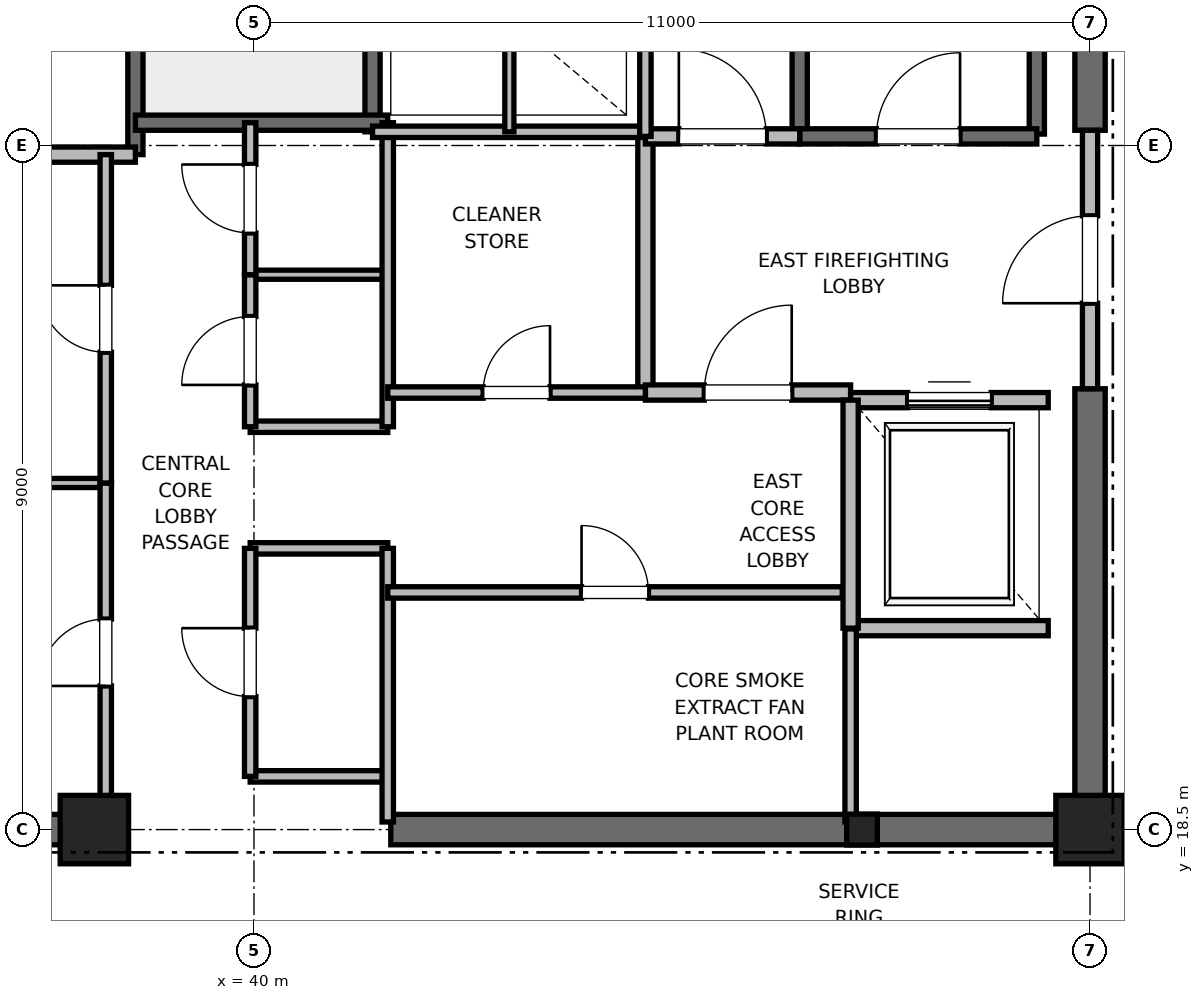
"""IFC4 building model, lengths in metres.
Left out: names, types, materials, properties, quantities, classifications, styles, units other than length and angle.
Written with IfcOpenShell. Run it as: python <this file> out.ifc"""

import sys

from ifc_helpers import new_model, si_unit, direction, frame, frame_2d, origin, origin_2d, place, context, subcontext, project, spatial, rectangle, i_section, extrude, element, fill, save


model = new_model("IFC4")
c1 = context("Model", 3, precision=1e-05, world=origin(), true_north=direction((0.0, 1.0)))
c2 = subcontext(c1, "Body", "Model", "MODEL_VIEW")
j1 = project(units=[si_unit("LENGTHUNIT", "METRE"), si_unit("PLANEANGLEUNIT", "RADIAN")], contexts=[c1])
p1 = place(None, origin())
s1 = spatial("IfcSite", under=j1, at=p1, CompositionType="ELEMENT")
p2 = place(p1, origin())
s2 = spatial("IfcBuilding", under=s1, at=p2, CompositionType="ELEMENT")
p3 = place(p2, frame((0.0, 0.0, 342.8)))
s3 = spatial("IfcBuildingStorey", under=s2, at=p3, CompositionType="ELEMENT", Elevation=342.8)
for number, where, z_axis, x_axis in (
    (1, (51.0, 18.5, 0.0), (0.0, 0.0, 1.0), (1.0, 0.0, 0.0)),
    (2, (37.9, 18.5, 0.0), (0.0, 0.0, 1.0), (1.0, 0.0, 0.0)),
):
    element("IfcColumn", number, at=place(p3, frame(where, z_axis=z_axis, x_axis=x_axis)), inside=s3, PredefinedType="PILASTER", context=c2, shape_type="SweptSolid", body=[
        extrude(rectangle(XDim=0.9, YDim=0.9, at=origin_2d()), origin(), (0.0, 0.0, 1.0), 6.0),
    ])
p4 = place(p3, frame((48.0, 18.5, 0.0), z_axis=(0.0, 0.0, 1.0), x_axis=(1.0, 0.0, 0.0)))
e3 = element("IfcColumn", 3, at=p4, inside=s3, PredefinedType="COLUMN", context=c2, shape_type="SweptSolid", body=[
    extrude(i_section(OverallWidth=0.403, OverallDepth=0.406, WebThickness=0.027, FlangeThickness=0.043, FilletRadius=0.015, at=origin_2d()), origin(), (0.0, 0.0, 1.0), 6.0),
])
for number, where, z_axis, x_axis in (
    (4, (29.0, 18.5, 0.0), (0.0, 0.0, 1.0), (1.0, 0.0, 0.0)),
    (5, (41.8, 18.5, 0.0), (0.0, 0.0, 1.0), (1.0, 0.0, 0.0)),
):
    element("IfcWall", number, at=place(p3, frame(where, z_axis=z_axis, x_axis=x_axis)), inside=s3, PredefinedType="SHEAR", context=c2, shape_type="SweptSolid", body=[
        extrude(rectangle(XDim=9.2, YDim=0.4, at=frame_2d((4.6, 0.0))), origin(), (0.0, 0.0, 1.0), 5.7),
    ])
p5 = place(p3, frame((51.0, 18.5, 0.0), z_axis=(0.0, 0.0, 1.0), x_axis=(0.0, 1.0, 0.0)))
e6 = element("IfcWall", 6, at=p5, inside=s3, PredefinedType="SHEAR", context=c2, shape_type="SweptSolid", body=[
    extrude(rectangle(XDim=5.8, YDim=0.4, at=frame_2d((2.9, 0.0))), origin(), (0.0, 0.0, 1.0), 5.7),
])
p6 = place(p3, frame((51.0, 27.7, 0.0), z_axis=(0.0, 0.0, 1.0), x_axis=(0.0, 1.0, 0.0)))
e7 = element("IfcWall", 7, at=p6, inside=s3, PredefinedType="SHEAR", context=c2, shape_type="SweptSolid", body=[
    extrude(rectangle(XDim=8.8, YDim=0.4, at=frame_2d((4.4, 0.0))), origin(), (0.0, 0.0, 1.0), 5.7),
])
p7 = place(p3, frame((50.3, 27.65, 0.0), z_axis=(0.0, 0.0, 1.0), x_axis=(0.0, 1.0, 0.0)))
e8 = element("IfcWall", 8, at=p7, inside=s3, PredefinedType="SOLIDWALL", context=c2, shape_type="SweptSolid", body=[
    extrude(rectangle(XDim=8.15, YDim=0.2, at=frame_2d((4.075, 0.0))), origin(), (0.0, 0.0, 1.0), 5.7),
])
p8 = place(p3, frame((47.18, 27.62, 0.0), z_axis=(0.0, 0.0, 1.0), x_axis=(0.0, 1.0, 0.0)))
e9 = element("IfcWall", 9, at=p8, inside=s3, PredefinedType="SOLIDWALL", context=c2, shape_type="SweptSolid", body=[
    extrude(rectangle(XDim=8.18, YDim=0.2, at=frame_2d((4.09, 0.0))), origin(), (0.0, 0.0, 1.0), 5.7),
])
p9 = place(p3, frame((47.18, 27.62, 0.0), z_axis=(0.0, 0.0, 1.0), x_axis=(1.0, 0.0, 0.0)))
e10 = element("IfcWall", 10, at=p9, inside=s3, PredefinedType="SOLIDWALL", context=c2, shape_type="SweptSolid", body=[
    extrude(rectangle(XDim=3.12, YDim=0.2, at=frame_2d((1.56, 0.0))), origin(), (0.0, 0.0, 1.0), 5.7),
])
p10 = place(p9, frame((1.01, 0.0, 0.0)))
e11 = element("IfcOpeningElement", 11, at=p10, cuts=e10, PredefinedType="OPENING", context=c2, shape_type="SweptSolid", body=[
    extrude(rectangle(XDim=1.1, YDim=2.15, at=frame_2d((0.55, 1.075))), frame((0.0, 0.1, 0.0), z_axis=(0.0, -1.0, 0.0), x_axis=(1.0, 0.0, 0.0)), (0.0, 0.0, 1.0), 0.2),
])
p11 = place(p3, frame((38.44, 27.38, 0.0), z_axis=(0.0, 0.0, 1.0), x_axis=(0.0, 1.0, 0.0)))
e12 = element("IfcWall", 12, at=p11, inside=s3, PredefinedType="SOLIDWALL", context=c2, shape_type="SweptSolid", body=[
    extrude(rectangle(XDim=8.87, YDim=0.2, at=frame_2d((4.435, 0.0))), origin(), (0.0, 0.0, 1.0), 5.7),
])
p12 = place(p3, frame((41.56, 27.68, 0.0), z_axis=(0.0, 0.0, 1.0), x_axis=(0.0, 1.0, 0.0)))
e13 = element("IfcWall", 13, at=p12, inside=s3, PredefinedType="SOLIDWALL", context=c2, shape_type="SweptSolid", body=[
    extrude(rectangle(XDim=8.57, YDim=0.2, at=frame_2d((4.285, 0.0))), origin(), (0.0, 0.0, 1.0), 5.7),
])
p13 = place(p3, frame((38.44, 27.8, 0.0), z_axis=(0.0, 0.0, 1.0), x_axis=(1.0, 0.0, 0.0)))
e14 = element("IfcWall", 14, at=p13, inside=s3, PredefinedType="SOLIDWALL", context=c2, shape_type="SweptSolid", body=[
    extrude(rectangle(XDim=3.32, YDim=0.2, at=frame_2d((1.66, 0.0))), origin(), (0.0, 0.0, 1.0), 5.7),
])
p14 = place(p3, frame((32.82, 27.38, 0.0), z_axis=(0.0, 0.0, 1.0), x_axis=(1.0, 0.0, 0.0)))
e15 = element("IfcWall", 15, at=p14, inside=s3, PredefinedType="PARTITIONING", context=c2, shape_type="SweptSolid", body=[
    extrude(rectangle(XDim=5.62, YDim=0.2, at=frame_2d((2.81, 0.0))), origin(), (0.0, 0.0, 1.0), 5.7),
])
p15 = place(p3, frame((45.15, 24.25, 0.0), z_axis=(0.0, 0.0, 1.0), x_axis=(0.0, 1.0, 0.0)))
e16 = element("IfcWall", 16, at=p15, inside=s3, PredefinedType="PARTITIONING", context=c2, shape_type="SweptSolid", body=[
    extrude(rectangle(XDim=3.37, YDim=0.2, at=frame_2d((1.685, 0.0))), origin(), (0.0, 0.0, 1.0), 5.7),
])
p16 = place(p3, frame((45.15, 24.25, 0.0), z_axis=(0.0, 0.0, 1.0), x_axis=(1.0, 0.0, 0.0)))
e17 = element("IfcWall", 17, at=p16, inside=s3, PredefinedType="PARTITIONING", context=c2, shape_type="SweptSolid", body=[
    extrude(rectangle(XDim=2.7, YDim=0.2, at=frame_2d((1.35, 0.0))), origin(), (0.0, 0.0, 1.0), 5.7),
])
p17 = place(p16, frame((0.775, 0.0, 0.0)))
e18 = element("IfcOpeningElement", 18, at=p17, cuts=e17, PredefinedType="OPENING", context=c2, shape_type="SweptSolid", body=[
    extrude(rectangle(XDim=1.15, YDim=2.2, at=frame_2d((0.575, 1.1))), frame((0.0, 0.1, 0.0), z_axis=(0.0, -1.0, 0.0), x_axis=(1.0, 0.0, 0.0)), (0.0, 0.0, 1.0), 0.2),
])
p18 = place(p3, frame((45.15, 27.62, 0.0), z_axis=(0.0, 0.0, 1.0), x_axis=(1.0, 0.0, 0.0)))
e19 = element("IfcWall", 19, at=p18, inside=s3, PredefinedType="PARTITIONING", context=c2, shape_type="SweptSolid", body=[
    extrude(rectangle(XDim=2.03, YDim=0.2, at=frame_2d((1.015, 0.0))), origin(), (0.0, 0.0, 1.0), 5.7),
])
p19 = place(p18, frame((0.44, 0.0, 0.0)))
e20 = element("IfcOpeningElement", 20, at=p19, cuts=e19, PredefinedType="OPENING", context=c2, shape_type="SweptSolid", body=[
    extrude(rectangle(XDim=1.15, YDim=2.2, at=frame_2d((0.575, 1.1))), frame((0.0, 0.1, 0.0), z_axis=(0.0, -1.0, 0.0), x_axis=(1.0, 0.0, 0.0)), (0.0, 0.0, 1.0), 0.2),
])
p20 = place(p3, frame((51.0, 24.3, 0.0), z_axis=(0.0, 0.0, 1.0), x_axis=(0.0, 1.0, 0.0)))
e21 = element("IfcWall", 21, at=p20, inside=s3, PredefinedType="PARTITIONING", context=c2, shape_type="SweptSolid", body=[
    extrude(rectangle(XDim=3.4, YDim=0.2, at=frame_2d((1.7, 0.0))), origin(), (0.0, 0.0, 1.0), 4.78),
])
p21 = place(p20, frame((1.125, 0.0, 0.0)))
e22 = element("IfcOpeningElement", 22, at=p21, cuts=e21, PredefinedType="OPENING", context=c2, shape_type="SweptSolid", body=[
    extrude(rectangle(XDim=1.15, YDim=2.2, at=frame_2d((0.575, 1.1))), frame((0.0, 0.1, 0.0), z_axis=(0.0, -1.0, 0.0), x_axis=(1.0, 0.0, 0.0)), (0.0, 0.0, 1.0), 0.2),
])
p22 = place(p3, frame((47.85, 21.15, 0.0), z_axis=(0.0, 0.0, 1.0), x_axis=(1.0, 0.0, 0.0)))
e23 = element("IfcWall", 23, at=p22, inside=s3, PredefinedType="SOLIDWALL", context=c2, shape_type="SweptSolid", body=[
    extrude(rectangle(XDim=2.6, YDim=0.2, at=frame_2d((1.3, 0.0))), origin(), (0.0, 0.0, 1.0), 5.7),
])
p23 = place(p3, frame((50.45, 24.15, 0.0), z_axis=(0.0, 0.0, 1.0), x_axis=(-1.0, 0.0, 0.0)))
e24 = element("IfcWall", 24, at=p23, inside=s3, PredefinedType="SOLIDWALL", context=c2, shape_type="SweptSolid", body=[
    extrude(rectangle(XDim=2.6, YDim=0.2, at=frame_2d((1.3, 0.0))), origin(), (0.0, 0.0, 1.0), 4.78),
])
p24 = place(p23, frame((0.75, 0.0, 0.0)))
e25 = element("IfcOpeningElement", 25, at=p24, cuts=e24, PredefinedType="OPENING", context=c2, shape_type="SweptSolid", body=[
    extrude(rectangle(XDim=1.1, YDim=2.2, at=frame_2d((0.55, 1.1))), frame((0.0, 0.1, 0.0), z_axis=(0.0, -1.0, 0.0), x_axis=(1.0, 0.0, 0.0)), (0.0, 0.0, 1.0), 0.2),
])
p25 = place(p3, frame((47.85, 24.15, 0.0), z_axis=(0.0, 0.0, 1.0), x_axis=(0.0, -1.0, 0.0)))
e26 = element("IfcWall", 26, at=p25, inside=s3, PredefinedType="SOLIDWALL", context=c2, shape_type="SweptSolid", body=[
    extrude(rectangle(XDim=3.0, YDim=0.2, at=frame_2d((1.5, 0.0))), origin(), (0.0, 0.0, 1.0), 5.7),
])
for number, where, z_axis, x_axis in (
    (27, (39.95, 19.2, 0.0), (0.0, 0.0, 1.0), (1.0, 0.0, 0.0)),
    (28, (39.95, 22.2, 0.0), (0.0, 0.0, 1.0), (1.0, 0.0, 0.0)),
    (29, (39.95, 23.8, 0.0), (0.0, 0.0, 1.0), (1.0, 0.0, 0.0)),
):
    element("IfcWall", number, at=place(p3, frame(where, z_axis=z_axis, x_axis=x_axis)), inside=s3, PredefinedType="PARTITIONING", context=c2, shape_type="SweptSolid", body=[
        extrude(rectangle(XDim=1.81, YDim=0.15, at=frame_2d((0.905, 0.0))), origin(), (0.0, 0.0, 1.0), 2.85),
    ])
p26 = place(p3, frame((39.95, 25.8, 0.0), z_axis=(0.0, 0.0, 1.0), x_axis=(1.0, 0.0, 0.0)))
e30 = element("IfcWall", 30, at=p26, inside=s3, PredefinedType="PARTITIONING", context=c2, shape_type="SweptSolid", body=[
    extrude(rectangle(XDim=1.81, YDim=0.12, at=frame_2d((0.905, 0.0))), origin(), (0.0, 0.0, 1.0), 2.85),
])
p27 = place(p3, frame((41.76, 18.6, 0.0), z_axis=(0.0, 0.0, 1.0), x_axis=(0.0, 1.0, 0.0)))
e31 = element("IfcWall", 31, at=p27, inside=s3, PredefinedType="PARTITIONING", context=c2, shape_type="SweptSolid", body=[
    extrude(rectangle(XDim=3.6, YDim=0.15, at=frame_2d((1.8, 0.0))), origin(), (0.0, 0.0, 1.0), 2.85),
])
p28 = place(p3, frame((41.76, 23.8, 0.0), z_axis=(0.0, 0.0, 1.0), x_axis=(0.0, 1.0, 0.0)))
e32 = element("IfcWall", 32, at=p28, inside=s3, PredefinedType="PARTITIONING", context=c2, shape_type="SweptSolid", body=[
    extrude(rectangle(XDim=4.0, YDim=0.15, at=frame_2d((2.0, 0.0))), origin(), (0.0, 0.0, 1.0), 2.85),
])
p29 = place(p3, frame((39.95, 19.2, 0.0), z_axis=(0.0, 0.0, 1.0), x_axis=(0.0, 1.0, 0.0)))
e33 = element("IfcWall", 33, at=p29, inside=s3, PredefinedType="PARTITIONING", context=c2, shape_type="SweptSolid", body=[
    extrude(rectangle(XDim=3.0, YDim=0.15, at=frame_2d((1.5, 0.0))), origin(), (0.0, 0.0, 1.0), 2.85),
])
p30 = place(p29, frame((1.05, 0.0, 0.0)))
e34 = element("IfcOpeningElement", 34, at=p30, cuts=e33, PredefinedType="OPENING", context=c2, shape_type="SweptSolid", body=[
    extrude(rectangle(XDim=0.9, YDim=2.1, at=frame_2d((0.45, 1.05))), frame((0.0, 0.075, 0.0), z_axis=(0.0, -1.0, 0.0), x_axis=(1.0, 0.0, 0.0)), (0.0, 0.0, 1.0), 0.15),
])
p31 = place(p3, frame((39.95, 23.8, 0.0), z_axis=(0.0, 0.0, 1.0), x_axis=(0.0, 1.0, 0.0)))
e35 = element("IfcWall", 35, at=p31, inside=s3, PredefinedType="PARTITIONING", context=c2, shape_type="SweptSolid", body=[
    extrude(rectangle(XDim=2.0, YDim=0.15, at=frame_2d((1.0, 0.0))), origin(), (0.0, 0.0, 1.0), 2.85),
])
p32 = place(p31, frame((0.55, 0.0, 0.0)))
e36 = element("IfcOpeningElement", 36, at=p32, cuts=e35, PredefinedType="OPENING", context=c2, shape_type="SweptSolid", body=[
    extrude(rectangle(XDim=0.9, YDim=2.1, at=frame_2d((0.45, 1.05))), frame((0.0, 0.075, 0.0), z_axis=(0.0, -1.0, 0.0), x_axis=(1.0, 0.0, 0.0)), (0.0, 0.0, 1.0), 0.15),
])
p33 = place(p3, frame((39.95, 25.8, 0.0), z_axis=(0.0, 0.0, 1.0), x_axis=(0.0, 1.0, 0.0)))
e37 = element("IfcWall", 37, at=p33, inside=s3, PredefinedType="PARTITIONING", context=c2, shape_type="SweptSolid", body=[
    extrude(rectangle(XDim=2.0, YDim=0.15, at=frame_2d((1.0, 0.0))), origin(), (0.0, 0.0, 1.0), 2.85),
])
p34 = place(p33, frame((0.55, 0.0, 0.0)))
e38 = element("IfcOpeningElement", 38, at=p34, cuts=e37, PredefinedType="OPENING", context=c2, shape_type="SweptSolid", body=[
    extrude(rectangle(XDim=0.9, YDim=2.1, at=frame_2d((0.45, 1.05))), frame((0.0, 0.075, 0.0), z_axis=(0.0, -1.0, 0.0), x_axis=(1.0, 0.0, 0.0)), (0.0, 0.0, 1.0), 0.15),
])
p35 = place(p3, frame((32.82, 23.06, 0.0), z_axis=(0.0, 0.0, 1.0), x_axis=(1.0, 0.0, 0.0)))
e39 = element("IfcWall", 39, at=p35, inside=s3, PredefinedType="PARTITIONING", context=c2, shape_type="SweptSolid", body=[
    extrude(rectangle(XDim=5.23, YDim=0.12, at=frame_2d((2.615, 0.0))), origin(), (0.0, 0.0, 1.0), 2.85),
])
p36 = place(p3, frame((38.05, 18.6, 0.0), z_axis=(0.0, 0.0, 1.0), x_axis=(0.0, 1.0, 0.0)))
e40 = element("IfcWall", 40, at=p36, inside=s3, PredefinedType="PARTITIONING", context=c2, shape_type="SweptSolid", body=[
    extrude(rectangle(XDim=4.46, YDim=0.15, at=frame_2d((2.23, 0.0))), origin(), (0.0, 0.0, 1.0), 2.85),
])
p37 = place(p36, frame((1.79, 0.0, 0.0)))
e41 = element("IfcOpeningElement", 41, at=p37, cuts=e40, PredefinedType="OPENING", context=c2, shape_type="SweptSolid", body=[
    extrude(rectangle(XDim=0.88, YDim=2.1, at=frame_2d((0.44, 1.05))), frame((0.0, 0.075, 0.0), z_axis=(0.0, -1.0, 0.0), x_axis=(1.0, 0.0, 0.0)), (0.0, 0.0, 1.0), 0.15),
])
p38 = place(p3, frame((38.05, 23.06, 0.0), z_axis=(0.0, 0.0, 1.0), x_axis=(0.0, 1.0, 0.0)))
e42 = element("IfcWall", 42, at=p38, inside=s3, PredefinedType="PARTITIONING", context=c2, shape_type="SweptSolid", body=[
    extrude(rectangle(XDim=4.32, YDim=0.15, at=frame_2d((2.16, 0.0))), origin(), (0.0, 0.0, 1.0), 2.85),
])
p39 = place(p38, frame((1.72, 0.0, 0.0)))
e43 = element("IfcOpeningElement", 43, at=p39, cuts=e42, PredefinedType="OPENING", context=c2, shape_type="SweptSolid", body=[
    extrude(rectangle(XDim=0.88, YDim=2.1, at=frame_2d((0.44, 1.05))), frame((0.0, 0.075, 0.0), z_axis=(0.0, -1.0, 0.0), x_axis=(1.0, 0.0, 0.0)), (0.0, 0.0, 1.0), 0.15),
])
p40 = place(p3, frame((41.56, 27.68, 0.0), z_axis=(0.0, 0.0, 1.0), x_axis=(1.0, 0.0, 0.0)))
e44 = element("IfcWall", 44, at=p40, inside=s3, PredefinedType="PARTITIONING", context=c2, shape_type="SweptSolid", body=[
    extrude(rectangle(XDim=3.59, YDim=0.15, at=frame_2d((1.795, 0.0))), origin(), (0.0, 0.0, 1.0), 2.85),
])
p41 = place(p3, frame((47.85, 18.6, 0.0), z_axis=(0.0, 0.0, 1.0), x_axis=(0.0, 1.0, 0.0)))
e45 = element("IfcWall", 45, at=p41, inside=s3, PredefinedType="PARTITIONING", context=c2, shape_type="SweptSolid", body=[
    extrude(rectangle(XDim=2.54, YDim=0.15, at=frame_2d((1.27, 0.0))), origin(), (0.0, 0.0, 1.0), 2.85),
])
p42 = place(p3, frame((41.76, 21.62, 0.0), z_axis=(0.0, 0.0, 1.0), x_axis=(1.0, 0.0, 0.0)))
e46 = element("IfcWall", 46, at=p42, inside=s3, PredefinedType="PARTITIONING", context=c2, shape_type="SweptSolid", body=[
    extrude(rectangle(XDim=5.98, YDim=0.15, at=frame_2d((2.99, 0.0))), origin(), (0.0, 0.0, 1.0), 2.85),
])
p43 = place(p42, frame((2.55, 0.0, 0.0)))
e47 = element("IfcOpeningElement", 47, at=p43, cuts=e46, PredefinedType="OPENING", context=c2, shape_type="SweptSolid", body=[
    extrude(rectangle(XDim=0.88, YDim=2.1, at=frame_2d((0.44, 1.05))), frame((0.0, 0.075, 0.0), z_axis=(0.0, -1.0, 0.0), x_axis=(1.0, 0.0, 0.0)), (0.0, 0.0, 1.0), 0.15),
])
p44 = place(p3, frame((41.76, 24.25, 0.0), z_axis=(0.0, 0.0, 1.0), x_axis=(1.0, 0.0, 0.0)))
e48 = element("IfcWall", 48, at=p44, inside=s3, PredefinedType="PARTITIONING", context=c2, shape_type="SweptSolid", body=[
    extrude(rectangle(XDim=3.39, YDim=0.15, at=frame_2d((1.695, 0.0))), origin(), (0.0, 0.0, 1.0), 2.85),
])
p45 = place(p44, frame((1.255, 0.0, 0.0)))
e49 = element("IfcOpeningElement", 49, at=p45, cuts=e48, PredefinedType="OPENING", context=c2, shape_type="SweptSolid", body=[
    extrude(rectangle(XDim=0.88, YDim=2.1, at=frame_2d((0.44, 1.05))), frame((0.0, 0.075, 0.0), z_axis=(0.0, -1.0, 0.0), x_axis=(1.0, 0.0, 0.0)), (0.0, 0.0, 1.0), 0.15),
])
p46 = place(p3, frame((45.15, 27.62, 0.0), z_axis=(0.0, 0.0, 1.0), x_axis=(0.0, 1.0, 0.0)))
e50 = element("IfcWall", 50, at=p46, inside=s3, PredefinedType="PARTITIONING", context=c2, shape_type="SweptSolid", body=[
    extrude(rectangle(XDim=3.1, YDim=0.15, at=frame_2d((1.55, 0.0))), origin(), (0.0, 0.0, 1.0), 2.85),
])
p47 = place(p3, frame((43.36, 27.68, 0.0), z_axis=(0.0, 0.0, 1.0), x_axis=(0.0, 1.0, 0.0)))
e51 = element("IfcWall", 51, at=p47, inside=s3, PredefinedType="PARTITIONING", context=c2, shape_type="SweptSolid", body=[
    extrude(rectangle(XDim=3.04, YDim=0.12, at=frame_2d((1.52, 0.0))), origin(), (0.0, 0.0, 1.0), 2.85),
])
p48 = place(p10, origin())
e52 = element("IfcDoor", 52, at=p48, inside=s3, OperationType="SINGLE_SWING_RIGHT", PredefinedType="DOOR", context=c2, shape_type="SweptSolid", body=[
    extrude(rectangle(XDim=1.1, YDim=2.15, at=frame_2d((0.55, 1.075))), frame((0.0, 0.025, 0.0), z_axis=(0.0, -1.0, 0.0), x_axis=(1.0, 0.0, 0.0)), (0.0, 0.0, 1.0), 0.05),
])
fill(e11, e52)
p49 = place(p17, origin())
e53 = element("IfcDoor", 53, at=p49, inside=s3, OperationType="SINGLE_SWING_RIGHT", PredefinedType="DOOR", context=c2, shape_type="SweptSolid", body=[
    extrude(rectangle(XDim=1.15, YDim=2.2, at=frame_2d((0.575, 1.1))), frame((0.0, 0.025, 0.0), z_axis=(0.0, -1.0, 0.0), x_axis=(1.0, 0.0, 0.0)), (0.0, 0.0, 1.0), 0.05),
])
fill(e18, e53)
p50 = place(p19, origin())
e54 = element("IfcDoor", 54, at=p50, inside=s3, OperationType="SINGLE_SWING_LEFT", PredefinedType="DOOR", context=c2, shape_type="SweptSolid", body=[
    extrude(rectangle(XDim=1.15, YDim=2.2, at=frame_2d((0.575, 1.1))), frame((0.0, 0.025, 0.0), z_axis=(0.0, -1.0, 0.0), x_axis=(1.0, 0.0, 0.0)), (0.0, 0.0, 1.0), 0.05),
])
fill(e20, e54)
p51 = place(p21, origin())
e55 = element("IfcDoor", 55, at=p51, inside=s3, OperationType="SINGLE_SWING_LEFT", PredefinedType="DOOR", context=c2, shape_type="SweptSolid", body=[
    extrude(rectangle(XDim=1.15, YDim=2.2, at=frame_2d((0.575, 1.1))), frame((0.0, 0.025, 0.0), z_axis=(0.0, -1.0, 0.0), x_axis=(1.0, 0.0, 0.0)), (0.0, 0.0, 1.0), 0.05),
])
fill(e22, e55)
p52 = place(p24, origin())
e56 = element("IfcDoor", 56, at=p52, inside=s3, OperationType="SLIDING_TO_RIGHT", PredefinedType="DOOR", context=c2, shape_type="SweptSolid", body=[
    extrude(rectangle(XDim=1.1, YDim=2.2, at=frame_2d((0.55, 1.1))), frame((0.0, 0.025, 0.0), z_axis=(0.0, -1.0, 0.0), x_axis=(1.0, 0.0, 0.0)), (0.0, 0.0, 1.0), 0.05),
])
fill(e25, e56)
p53 = place(p30, origin())
e57 = element("IfcDoor", 57, at=p53, inside=s3, OperationType="SINGLE_SWING_RIGHT", PredefinedType="DOOR", context=c2, shape_type="SweptSolid", body=[
    extrude(rectangle(XDim=0.9, YDim=2.1, at=frame_2d((0.45, 1.05))), frame((0.0, 0.025, 0.0), z_axis=(0.0, -1.0, 0.0), x_axis=(1.0, 0.0, 0.0)), (0.0, 0.0, 1.0), 0.05),
])
fill(e34, e57)
p54 = place(p32, origin())
e58 = element("IfcDoor", 58, at=p54, inside=s3, OperationType="SINGLE_SWING_LEFT", PredefinedType="DOOR", context=c2, shape_type="SweptSolid", body=[
    extrude(rectangle(XDim=0.9, YDim=2.1, at=frame_2d((0.45, 1.05))), frame((0.0, 0.025, 0.0), z_axis=(0.0, -1.0, 0.0), x_axis=(1.0, 0.0, 0.0)), (0.0, 0.0, 1.0), 0.05),
])
fill(e36, e58)
p55 = place(p34, origin())
e59 = element("IfcDoor", 59, at=p55, inside=s3, OperationType="SINGLE_SWING_RIGHT", PredefinedType="DOOR", context=c2, shape_type="SweptSolid", body=[
    extrude(rectangle(XDim=0.9, YDim=2.1, at=frame_2d((0.45, 1.05))), frame((0.0, 0.025, 0.0), z_axis=(0.0, -1.0, 0.0), x_axis=(1.0, 0.0, 0.0)), (0.0, 0.0, 1.0), 0.05),
])
fill(e38, e59)
p56 = place(p37, origin())
e60 = element("IfcDoor", 60, at=p56, inside=s3, OperationType="SINGLE_SWING_LEFT", PredefinedType="DOOR", context=c2, shape_type="SweptSolid", body=[
    extrude(rectangle(XDim=0.88, YDim=2.1, at=frame_2d((0.44, 1.05))), frame((0.0, 0.025, 0.0), z_axis=(0.0, -1.0, 0.0), x_axis=(1.0, 0.0, 0.0)), (0.0, 0.0, 1.0), 0.05),
])
fill(e41, e60)
p57 = place(p39, origin())
e61 = element("IfcDoor", 61, at=p57, inside=s3, OperationType="SINGLE_SWING_RIGHT", PredefinedType="DOOR", context=c2, shape_type="SweptSolid", body=[
    extrude(rectangle(XDim=0.88, YDim=2.1, at=frame_2d((0.44, 1.05))), frame((0.0, 0.025, 0.0), z_axis=(0.0, -1.0, 0.0), x_axis=(1.0, 0.0, 0.0)), (0.0, 0.0, 1.0), 0.05),
])
fill(e43, e61)
p58 = place(p43, origin())
e62 = element("IfcDoor", 62, at=p58, inside=s3, OperationType="SINGLE_SWING_LEFT", PredefinedType="DOOR", context=c2, shape_type="SweptSolid", body=[
    extrude(rectangle(XDim=0.88, YDim=2.1, at=frame_2d((0.44, 1.05))), frame((0.0, 0.025, 0.0), z_axis=(0.0, -1.0, 0.0), x_axis=(1.0, 0.0, 0.0)), (0.0, 0.0, 1.0), 0.05),
])
fill(e47, e62)
p59 = place(p45, origin())
e63 = element("IfcDoor", 63, at=p59, inside=s3, OperationType="SINGLE_SWING_RIGHT", PredefinedType="DOOR", context=c2, shape_type="SweptSolid", body=[
    extrude(rectangle(XDim=0.88, YDim=2.1, at=frame_2d((0.44, 1.05))), frame((0.0, 0.025, 0.0), z_axis=(0.0, -1.0, 0.0), x_axis=(1.0, 0.0, 0.0)), (0.0, 0.0, 1.0), 0.05),
])
fill(e49, e63)
save(model, sys.argv[1])
